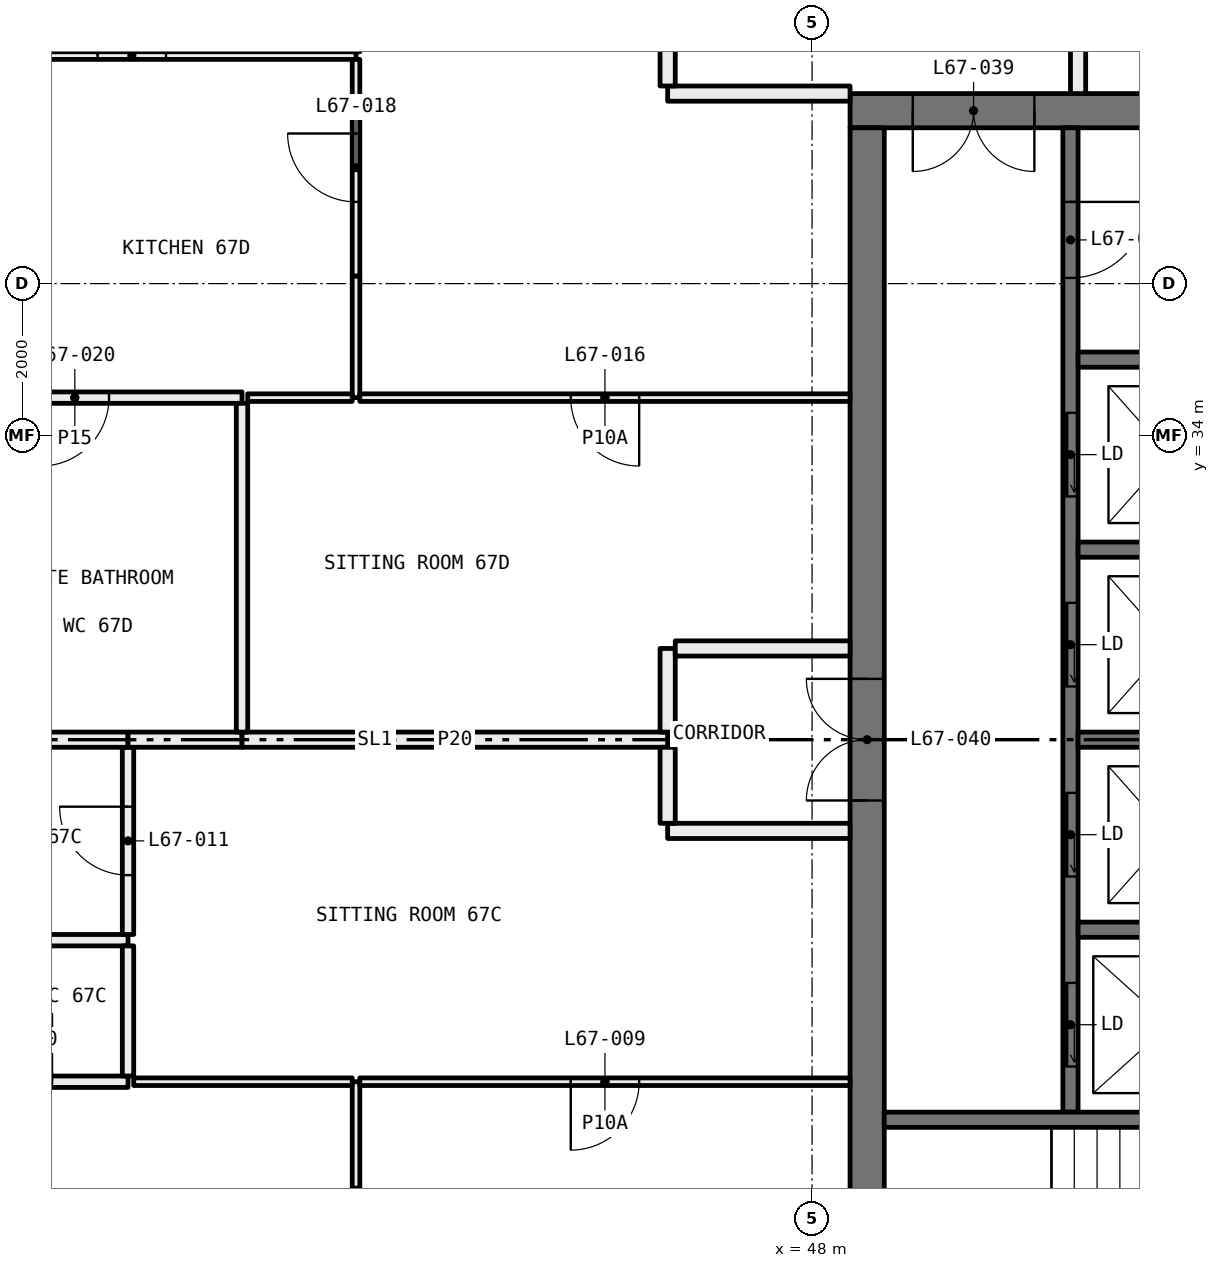
"""IFC4 building model, lengths in metres.
Left out: names, types, materials, properties, quantities, classifications, styles, units other than length and angle.
Written with IfcOpenShell. Run it as: python <this file> out.ifc"""

import sys

from ifc_helpers import new_model, si_unit, direction, frame, frame_2d, origin, place, context, subcontext, project, spatial, rectangle, extrude, element, fill, save


model = new_model("IFC4")
c1 = context("Model", 3, precision=1e-05, world=origin(), true_north=direction((0.0, 1.0)))
c2 = subcontext(c1, "Body", "Model", "MODEL_VIEW")
j1 = project(units=[si_unit("LENGTHUNIT", "METRE"), si_unit("PLANEANGLEUNIT", "RADIAN")], contexts=[c1])
p1 = place(None, origin())
s1 = spatial("IfcSite", under=j1, at=p1, CompositionType="ELEMENT")
p2 = place(p1, origin())
s2 = spatial("IfcBuilding", under=s1, at=p2, CompositionType="ELEMENT")
p3 = place(p2, frame((0.0, 0.0, 249.0)))
s3 = spatial("IfcBuildingStorey", under=s2, at=p3, CompositionType="ELEMENT", Elevation=249.0)
p4 = place(p3, frame((42.0, 24.1, 0.0), z_axis=(0.0, 0.0, 1.0), x_axis=(0.0, 1.0, 0.0)))
e1 = element("IfcWall", 1, at=p4, inside=s3, PredefinedType="PARTITIONING", context=c2, shape_type="SweptSolid", body=[
    extrude(rectangle(XDim=1.4, YDim=0.1, at=frame_2d((0.7, 0.0))), origin(), (0.0, 0.0, 1.0), 3.05),
])
p5 = place(p3, frame((39.0, 25.5, 0.0), z_axis=(0.0, 0.0, 1.0), x_axis=(-1.0, 0.0, 0.0)))
e2 = element("IfcWall", 2, at=p5, inside=s3, PredefinedType="PARTITIONING", context=c2, shape_type="SweptSolid", body=[
    extrude(rectangle(XDim=2.9, YDim=0.15, at=frame_2d((1.45, 0.0))), origin(), (0.0, 0.0, 1.0), 3.05),
])
p6 = place(p5, frame((1.0, 0.0, 0.0)))
e3 = element("IfcOpeningElement", 3, at=p6, cuts=e2, PredefinedType="OPENING", context=c2, shape_type="SweptSolid", body=[
    extrude(rectangle(XDim=0.9, YDim=2.1, at=frame_2d((0.45, 1.05))), frame((0.0, 0.085, 0.0), z_axis=(0.0, -1.0, 0.0), x_axis=(1.0, 0.0, 0.0)), (0.0, 0.0, 1.0), 0.17),
])
p7 = place(p3, frame((41.95, 25.5, 0.0), z_axis=(0.0, 0.0, 1.0), x_axis=(-1.0, 0.0, 0.0)))
e4 = element("IfcWall", 4, at=p7, inside=s3, PredefinedType="PARTITIONING", context=c2, shape_type="SweptSolid", body=[
    extrude(rectangle(XDim=2.875, YDim=0.1, at=frame_2d((1.438, 0.0))), origin(), (0.0, 0.0, 1.0), 3.05),
])
p8 = place(p3, frame((48.5, 25.5, 0.0), z_axis=(0.0, 0.0, 1.0), x_axis=(-1.0, 0.0, 0.0)))
e5 = element("IfcWall", 5, at=p8, inside=s3, PredefinedType="PARTITIONING", context=c2, shape_type="SweptSolid", body=[
    extrude(rectangle(XDim=6.45, YDim=0.1, at=frame_2d((3.225, 0.0))), origin(), (0.0, 0.0, 1.0), 3.05),
])
p9 = place(p8, frame((2.775, 0.0, 0.0)))
e6 = element("IfcOpeningElement", 6, at=p9, cuts=e5, PredefinedType="OPENING", context=c2, shape_type="SweptSolid", body=[
    extrude(rectangle(XDim=0.9, YDim=2.1, at=frame_2d((0.45, 1.05))), frame((0.0, 0.06, 0.0), z_axis=(0.0, -1.0, 0.0), x_axis=(1.0, 0.0, 0.0)), (0.0, 0.0, 1.0), 0.12),
])
p10 = place(p3, frame((39.0, 27.362, 0.0), z_axis=(0.0, 0.0, 1.0), x_axis=(-1.0, 0.0, 0.0)))
e7 = element("IfcWall", 7, at=p10, inside=s3, PredefinedType="PARTITIONING", context=c2, shape_type="SweptSolid", body=[
    extrude(rectangle(XDim=2.9, YDim=0.15, at=frame_2d((1.45, 0.0))), origin(), (0.0, 0.0, 1.0), 3.05),
])
p11 = place(p3, frame((39.0, 25.575, 0.0), z_axis=(0.0, 0.0, 1.0), x_axis=(0.0, 1.0, 0.0)))
e8 = element("IfcWall", 8, at=p11, inside=s3, PredefinedType="PARTITIONING", context=c2, shape_type="SweptSolid", body=[
    extrude(rectangle(XDim=1.712, YDim=0.15, at=frame_2d((0.856, 0.0))), origin(), (0.0, 0.0, 1.0), 3.05),
])
p12 = place(p3, frame((39.0, 27.437, 0.0), z_axis=(0.0, 0.0, 1.0), x_axis=(0.0, 1.0, 0.0)))
e9 = element("IfcWall", 9, at=p12, inside=s3, PredefinedType="PARTITIONING", context=c2, shape_type="SweptSolid", body=[
    extrude(rectangle(XDim=2.463, YDim=0.15, at=frame_2d((1.231, 0.0))), origin(), (0.0, 0.0, 1.0), 3.05),
])
p13 = place(p12, frame((0.781, 0.0, 0.0)))
e10 = element("IfcOpeningElement", 10, at=p13, cuts=e9, PredefinedType="OPENING", context=c2, shape_type="SweptSolid", body=[
    extrude(rectangle(XDim=0.9, YDim=2.1, at=frame_2d((0.45, 1.05))), frame((0.0, 0.085, 0.0), z_axis=(0.0, -1.0, 0.0), x_axis=(1.0, 0.0, 0.0)), (0.0, 0.0, 1.0), 0.17),
])
p14 = place(p3, frame((39.0, 30.0, 0.0), z_axis=(0.0, 0.0, 1.0), x_axis=(-1.0, 0.0, 0.0)))
e11 = element("IfcWall", 11, at=p14, inside=s3, PredefinedType="PARTITIONING", context=c2, shape_type="SweptSolid", body=[
    extrude(rectangle(XDim=2.9, YDim=0.2, at=frame_2d((1.45, 0.0))), origin(), (0.0, 0.0, 1.0), 3.05),
])
p15 = place(p3, frame((40.5, 30.0, 0.0), z_axis=(0.0, 0.0, 1.0), x_axis=(-1.0, 0.0, 0.0)))
e12 = element("IfcWall", 12, at=p15, inside=s3, PredefinedType="PARTITIONING", context=c2, shape_type="SweptSolid", body=[
    extrude(rectangle(XDim=1.5, YDim=0.2, at=frame_2d((0.75, 0.0))), origin(), (0.0, 0.0, 1.0), 3.05),
])
p16 = place(p3, frame((46.1, 30.0, 0.0), z_axis=(0.0, 0.0, 1.0), x_axis=(-1.0, 0.0, 0.0)))
e13 = element("IfcWall", 13, at=p16, inside=s3, PredefinedType="PARTITIONING", context=c2, shape_type="SweptSolid", body=[
    extrude(rectangle(XDim=5.6, YDim=0.2, at=frame_2d((2.8, 0.0))), origin(), (0.0, 0.0, 1.0), 3.05),
])
p17 = place(p3, frame((48.5, 28.8, 0.0), z_axis=(0.0, 0.0, 1.0), x_axis=(-1.0, 0.0, 0.0)))
e14 = element("IfcWall", 14, at=p17, inside=s3, PredefinedType="PARTITIONING", context=c2, shape_type="SweptSolid", body=[
    extrude(rectangle(XDim=2.4, YDim=0.2, at=frame_2d((1.2, 0.0))), origin(), (0.0, 0.0, 1.0), 3.05),
])
p18 = place(p3, frame((46.1, 28.9, 0.0), z_axis=(0.0, 0.0, 1.0), x_axis=(0.0, 1.0, 0.0)))
e15 = element("IfcWall", 15, at=p18, inside=s3, PredefinedType="PARTITIONING", context=c2, shape_type="SweptSolid", body=[
    extrude(rectangle(XDim=1.0, YDim=0.2, at=frame_2d((0.5, 0.0))), origin(), (0.0, 0.0, 1.0), 3.05),
])
p19 = place(p3, frame((51.5, 41.9, 0.0), z_axis=(0.0, 0.0, 1.0), x_axis=(0.0, -1.0, 0.0)))
e16 = element("IfcWall", 16, at=p19, inside=s3, PredefinedType="PARTITIONING", context=c2, shape_type="SweptSolid", body=[
    extrude(rectangle(XDim=3.4, YDim=0.2, at=frame_2d((1.7, 0.0))), origin(), (0.0, 0.0, 1.0), 3.05),
])
p20 = place(p19, frame((1.2, 0.0, 0.0)))
e17 = element("IfcOpeningElement", 17, at=p20, cuts=e16, PredefinedType="OPENING", context=c2, shape_type="SweptSolid", body=[
    extrude(rectangle(XDim=1.0, YDim=2.1, at=frame_2d((0.5, 1.05))), frame((0.0, 0.11, 0.0), z_axis=(0.0, -1.0, 0.0), x_axis=(1.0, 0.0, 0.0)), (0.0, 0.0, 1.0), 0.22),
])
p21 = place(p3, frame((42.0, 39.0, 0.0), z_axis=(0.0, 0.0, 1.0), x_axis=(-1.0, 0.0, 0.0)))
e18 = element("IfcWall", 18, at=p21, inside=s3, PredefinedType="PARTITIONING", context=c2, shape_type="SweptSolid", body=[
    extrude(rectangle(XDim=5.9, YDim=0.1, at=frame_2d((2.95, 0.0))), origin(), (0.0, 0.0, 1.0), 3.05),
])
p22 = place(p21, frame((2.5, 0.0, 0.0)))
e19 = element("IfcOpeningElement", 19, at=p22, cuts=e18, PredefinedType="OPENING", context=c2, shape_type="SweptSolid", body=[
    extrude(rectangle(XDim=0.9, YDim=2.1, at=frame_2d((0.45, 1.05))), frame((0.0, 0.06, 0.0), z_axis=(0.0, -1.0, 0.0), x_axis=(1.0, 0.0, 0.0)), (0.0, 0.0, 1.0), 0.12),
])
p23 = place(p3, frame((42.0, 34.5, 0.0), z_axis=(0.0, 0.0, 1.0), x_axis=(0.0, 1.0, 0.0)))
e20 = element("IfcWall", 20, at=p23, inside=s3, PredefinedType="PARTITIONING", context=c2, shape_type="SweptSolid", body=[
    extrude(rectangle(XDim=1.6, YDim=0.1, at=frame_2d((0.8, 0.0))), origin(), (0.0, 0.0, 1.0), 2.45),
])
p24 = place(p3, frame((42.0, 36.1, 0.0), z_axis=(0.0, 0.0, 1.0), x_axis=(0.0, 1.0, 0.0)))
e21 = element("IfcWall", 21, at=p24, inside=s3, PredefinedType="PARTITIONING", context=c2, shape_type="SweptSolid", body=[
    extrude(rectangle(XDim=2.85, YDim=0.1, at=frame_2d((1.425, 0.0))), origin(), (0.0, 0.0, 1.0), 3.05),
])
p25 = place(p24, frame((0.975, 0.0, 0.0)))
e22 = element("IfcOpeningElement", 22, at=p25, cuts=e21, PredefinedType="OPENING", context=c2, shape_type="SweptSolid", body=[
    extrude(rectangle(XDim=0.9, YDim=2.1, at=frame_2d((0.45, 1.05))), frame((0.0, 0.06, 0.0), z_axis=(0.0, -1.0, 0.0), x_axis=(1.0, 0.0, 0.0)), (0.0, 0.0, 1.0), 0.12),
])
p26 = place(p3, frame((36.1, 34.5, 0.0), z_axis=(0.0, 0.0, 1.0), x_axis=(1.0, 0.0, 0.0)))
e23 = element("IfcWall", 23, at=p26, inside=s3, PredefinedType="PARTITIONING", context=c2, shape_type="SweptSolid", body=[
    extrude(rectangle(XDim=4.4, YDim=0.15, at=frame_2d((2.2, 0.0))), origin(), (0.0, 0.0, 1.0), 3.05),
])
p27 = place(p26, frame((1.75, 0.0, 0.0)))
e24 = element("IfcOpeningElement", 24, at=p27, cuts=e23, PredefinedType="OPENING", context=c2, shape_type="SweptSolid", body=[
    extrude(rectangle(XDim=0.9, YDim=2.1, at=frame_2d((0.45, 1.05))), frame((0.0, 0.085, 0.0), z_axis=(0.0, -1.0, 0.0), x_axis=(1.0, 0.0, 0.0)), (0.0, 0.0, 1.0), 0.17),
])
p28 = place(p3, frame((40.575, 34.5, 0.0), z_axis=(0.0, 0.0, 1.0), x_axis=(1.0, 0.0, 0.0)))
e25 = element("IfcWall", 25, at=p28, inside=s3, PredefinedType="PARTITIONING", context=c2, shape_type="SweptSolid", body=[
    extrude(rectangle(XDim=1.375, YDim=0.1, at=frame_2d((0.688, 0.0))), origin(), (0.0, 0.0, 1.0), 3.05),
])
p29 = place(p3, frame((42.05, 34.5, 0.0), z_axis=(0.0, 0.0, 1.0), x_axis=(1.0, 0.0, 0.0)))
e26 = element("IfcWall", 26, at=p29, inside=s3, PredefinedType="PARTITIONING", context=c2, shape_type="SweptSolid", body=[
    extrude(rectangle(XDim=6.45, YDim=0.1, at=frame_2d((3.225, 0.0))), origin(), (0.0, 0.0, 1.0), 3.05),
])
p30 = place(p29, frame((2.775, 0.0, 0.0)))
e27 = element("IfcOpeningElement", 27, at=p30, cuts=e26, PredefinedType="OPENING", context=c2, shape_type="SweptSolid", body=[
    extrude(rectangle(XDim=0.9, YDim=2.1, at=frame_2d((0.45, 1.05))), frame((0.0, 0.06, 0.0), z_axis=(0.0, -1.0, 0.0), x_axis=(1.0, 0.0, 0.0)), (0.0, 0.0, 1.0), 0.12),
])
p31 = place(p3, frame((48.5, 38.5, 0.0), z_axis=(0.0, 0.0, 1.0), x_axis=(-1.0, 0.0, 0.0)))
e28 = element("IfcWall", 28, at=p31, inside=s3, PredefinedType="PARTITIONING", context=c2, shape_type="SweptSolid", body=[
    extrude(rectangle(XDim=2.4, YDim=0.2, at=frame_2d((1.2, 0.0))), origin(), (0.0, 0.0, 1.0), 3.05),
])
p32 = place(p3, frame((46.1, 38.6, 0.0), z_axis=(0.0, 0.0, 1.0), x_axis=(0.0, 1.0, 0.0)))
e29 = element("IfcWall", 29, at=p32, inside=s3, PredefinedType="PARTITIONING", context=c2, shape_type="SweptSolid", body=[
    extrude(rectangle(XDim=3.3, YDim=0.2, at=frame_2d((1.65, 0.0))), origin(), (0.0, 0.0, 1.0), 3.05),
])
p33 = place(p3, frame((40.5, 30.1, 0.0), z_axis=(0.0, 0.0, 1.0), x_axis=(0.0, 1.0, 0.0)))
e30 = element("IfcWall", 30, at=p33, inside=s3, PredefinedType="PARTITIONING", context=c2, shape_type="SweptSolid", body=[
    extrude(rectangle(XDim=4.325, YDim=0.15, at=frame_2d((2.163, 0.0))), origin(), (0.0, 0.0, 1.0), 3.05),
])
p34 = place(p3, frame((46.1, 30.1, 0.0), z_axis=(0.0, 0.0, 1.0), x_axis=(0.0, 1.0, 0.0)))
e31 = element("IfcWall", 31, at=p34, inside=s3, PredefinedType="PARTITIONING", context=c2, shape_type="SweptSolid", body=[
    extrude(rectangle(XDim=1.1, YDim=0.2, at=frame_2d((0.55, 0.0))), origin(), (0.0, 0.0, 1.0), 3.05),
])
p35 = place(p3, frame((46.2, 31.2, 0.0), z_axis=(0.0, 0.0, 1.0), x_axis=(1.0, 0.0, 0.0)))
e32 = element("IfcWall", 32, at=p35, inside=s3, PredefinedType="PARTITIONING", context=c2, shape_type="SweptSolid", body=[
    extrude(rectangle(XDim=2.3, YDim=0.2, at=frame_2d((1.15, 0.0))), origin(), (0.0, 0.0, 1.0), 3.05),
])
p36 = place(p3, frame((59.5, 38.275, 0.0), z_axis=(0.0, 0.0, 1.0), x_axis=(-1.0, 0.0, 0.0)))
e33 = element("IfcWall", 33, at=p36, inside=s3, PredefinedType="SHEAR", context=c2, shape_type="SweptSolid", body=[
    extrude(rectangle(XDim=11.0, YDim=0.45, at=frame_2d((5.5, 0.0))), origin(), (0.0, 0.0, 1.0), 3.05),
])
p37 = place(p36, frame((8.575, 0.0, 0.0)))
e34 = element("IfcOpeningElement", 34, at=p37, cuts=e33, PredefinedType="OPENING", context=c2, shape_type="SweptSolid", body=[
    extrude(rectangle(XDim=1.6, YDim=2.1, at=frame_2d((0.8, 1.05))), frame((0.0, 0.235, 0.0), z_axis=(0.0, -1.0, 0.0), x_axis=(1.0, 0.0, 0.0)), (0.0, 0.0, 1.0), 0.47),
])
p38 = place(p3, frame((48.725, 21.95, 0.0), z_axis=(0.0, 0.0, 1.0), x_axis=(0.0, 1.0, 0.0)))
e35 = element("IfcWall", 35, at=p38, inside=s3, PredefinedType="SHEAR", context=c2, shape_type="SweptSolid", body=[
    extrude(rectangle(XDim=16.1, YDim=0.45, at=frame_2d((8.05, 0.0))), origin(), (0.0, 0.0, 1.0), 3.05),
])
p39 = place(p38, frame((7.25, 0.0, 0.0)))
e36 = element("IfcOpeningElement", 36, at=p39, cuts=e35, PredefinedType="OPENING", context=c2, shape_type="SweptSolid", body=[
    extrude(rectangle(XDim=1.6, YDim=2.1, at=frame_2d((0.8, 1.05))), frame((0.0, 0.235, 0.0), z_axis=(0.0, -1.0, 0.0), x_axis=(1.0, 0.0, 0.0)), (0.0, 0.0, 1.0), 0.47),
])
p40 = place(p3, frame((51.4, 25.1, 0.0), z_axis=(0.0, 0.0, 1.0), x_axis=(0.0, 1.0, 0.0)))
e37 = element("IfcWall", 37, at=p40, inside=s3, PredefinedType="SOLIDWALL", context=c2, shape_type="SweptSolid", body=[
    extrude(rectangle(XDim=12.95, YDim=0.2, at=frame_2d((6.475, 0.0))), origin(), (0.0, 0.0, 1.0), 3.05),
])
p41 = place(p40, frame((0.6, 0.0, 0.0)))
e38 = element("IfcOpeningElement", 38, at=p41, cuts=e37, PredefinedType="OPENING", context=c2, shape_type="SweptSolid", body=[
    extrude(rectangle(XDim=1.1, YDim=2.1, at=frame_2d((0.55, 1.05))), frame((0.0, 0.11, 0.0), z_axis=(0.0, -1.0, 0.0), x_axis=(1.0, 0.0, 0.0)), (0.0, 0.0, 1.0), 0.22),
])
p42 = place(p40, frame((3.1, 0.0, 0.0)))
e39 = element("IfcOpeningElement", 39, at=p42, cuts=e37, PredefinedType="OPENING", context=c2, shape_type="SweptSolid", body=[
    extrude(rectangle(XDim=1.1, YDim=2.1, at=frame_2d((0.55, 1.05))), frame((0.0, 0.11, 0.0), z_axis=(0.0, -1.0, 0.0), x_axis=(1.0, 0.0, 0.0)), (0.0, 0.0, 1.0), 0.22),
])
p43 = place(p40, frame((5.6, 0.0, 0.0)))
e40 = element("IfcOpeningElement", 40, at=p43, cuts=e37, PredefinedType="OPENING", context=c2, shape_type="SweptSolid", body=[
    extrude(rectangle(XDim=1.1, YDim=2.1, at=frame_2d((0.55, 1.05))), frame((0.0, 0.11, 0.0), z_axis=(0.0, -1.0, 0.0), x_axis=(1.0, 0.0, 0.0)), (0.0, 0.0, 1.0), 0.22),
])
p44 = place(p40, frame((8.1, 0.0, 0.0)))
e41 = element("IfcOpeningElement", 41, at=p44, cuts=e37, PredefinedType="OPENING", context=c2, shape_type="SweptSolid", body=[
    extrude(rectangle(XDim=1.1, YDim=2.1, at=frame_2d((0.55, 1.05))), frame((0.0, 0.11, 0.0), z_axis=(0.0, -1.0, 0.0), x_axis=(1.0, 0.0, 0.0)), (0.0, 0.0, 1.0), 0.22),
])
p45 = place(p40, frame((10.975, 0.0, 0.0)))
e42 = element("IfcOpeningElement", 42, at=p45, cuts=e37, PredefinedType="OPENING", context=c2, shape_type="SweptSolid", body=[
    extrude(rectangle(XDim=1.0, YDim=2.1, at=frame_2d((0.5, 1.05))), frame((0.0, 0.11, 0.0), z_axis=(0.0, -1.0, 0.0), x_axis=(1.0, 0.0, 0.0)), (0.0, 0.0, 1.0), 0.22),
])
for number, where, z_axis, x_axis in (
    (43, (56.5, 25.0, 0.0), (0.0, 0.0, 1.0), (-1.0, 0.0, 0.0)),
    (44, (59.05, 35.0, 0.0), (0.0, 0.0, 1.0), (-1.0, 0.0, 0.0)),
):
    element("IfcWall", number, at=place(p3, frame(where, z_axis=z_axis, x_axis=x_axis)), inside=s3, PredefinedType="SOLIDWALL", context=c2, shape_type="SweptSolid", body=[
        extrude(rectangle(XDim=7.55, YDim=0.2, at=frame_2d((3.775, 0.0))), origin(), (0.0, 0.0, 1.0), 3.05),
    ])
for number, where, z_axis, x_axis in (
    (45, (53.9, 27.5, 0.0), (0.0, 0.0, 1.0), (-1.0, 0.0, 0.0)),
    (46, (53.9, 30.0, 0.0), (0.0, 0.0, 1.0), (-1.0, 0.0, 0.0)),
    (47, (53.9, 32.5, 0.0), (0.0, 0.0, 1.0), (-1.0, 0.0, 0.0)),
):
    element("IfcWall", number, at=place(p3, frame(where, z_axis=z_axis, x_axis=x_axis)), inside=s3, PredefinedType="SOLIDWALL", context=c2, shape_type="SweptSolid", body=[
        extrude(rectangle(XDim=2.4, YDim=0.2, at=frame_2d((1.2, 0.0))), origin(), (0.0, 0.0, 1.0), 3.05),
    ])
p46 = place(p9, origin())
e48 = element("IfcDoor", 48, at=p46, inside=s3, OperationType="SINGLE_SWING_LEFT", PredefinedType="DOOR", context=c2, shape_type="SweptSolid", body=[
    extrude(rectangle(XDim=0.9, YDim=2.1, at=frame_2d((0.45, 1.05))), frame((0.0, 0.025, 0.0), z_axis=(0.0, -1.0, 0.0), x_axis=(1.0, 0.0, 0.0)), (0.0, 0.0, 1.0), 0.05),
])
fill(e6, e48)
p47 = place(p13, origin())
e49 = element("IfcDoor", 49, at=p47, inside=s3, OperationType="SINGLE_SWING_LEFT", PredefinedType="DOOR", context=c2, shape_type="SweptSolid", body=[
    extrude(rectangle(XDim=0.9, YDim=2.1, at=frame_2d((0.45, 1.05))), frame((0.0, 0.025, 0.0), z_axis=(0.0, -1.0, 0.0), x_axis=(1.0, 0.0, 0.0)), (0.0, 0.0, 1.0), 0.05),
])
fill(e10, e49)
p48 = place(p30, frame((0.9, 0.0, 0.0), x_axis=(-1.0, 0.0, 0.0)))
e50 = element("IfcDoor", 50, at=p48, inside=s3, OperationType="SINGLE_SWING_RIGHT", PredefinedType="DOOR", context=c2, shape_type="SweptSolid", body=[
    extrude(rectangle(XDim=0.9, YDim=2.1, at=frame_2d((0.45, 1.05))), frame((0.0, 0.025, 0.0), z_axis=(0.0, -1.0, 0.0), x_axis=(1.0, 0.0, 0.0)), (0.0, 0.0, 1.0), 0.05),
])
fill(e27, e50)
p49 = place(p25, origin())
e51 = element("IfcDoor", 51, at=p49, inside=s3, OperationType="SINGLE_SWING_LEFT", PredefinedType="DOOR", context=c2, shape_type="SweptSolid", body=[
    extrude(rectangle(XDim=0.9, YDim=2.1, at=frame_2d((0.45, 1.05))), frame((0.0, 0.025, 0.0), z_axis=(0.0, -1.0, 0.0), x_axis=(1.0, 0.0, 0.0)), (0.0, 0.0, 1.0), 0.05),
])
fill(e22, e51)
p50 = place(p22, frame((0.9, 0.0, 0.0), x_axis=(-1.0, 0.0, 0.0)))
e52 = element("IfcDoor", 52, at=p50, inside=s3, OperationType="SINGLE_SWING_RIGHT", PredefinedType="DOOR", context=c2, shape_type="SweptSolid", body=[
    extrude(rectangle(XDim=0.9, YDim=2.1, at=frame_2d((0.45, 1.05))), frame((0.0, 0.025, 0.0), z_axis=(0.0, -1.0, 0.0), x_axis=(1.0, 0.0, 0.0)), (0.0, 0.0, 1.0), 0.05),
])
fill(e19, e52)
p51 = place(p27, frame((0.9, 0.0, 0.0), x_axis=(-1.0, 0.0, 0.0)))
e53 = element("IfcDoor", 53, at=p51, inside=s3, OperationType="SINGLE_SWING_LEFT", PredefinedType="DOOR", context=c2, shape_type="SweptSolid", body=[
    extrude(rectangle(XDim=0.9, YDim=2.1, at=frame_2d((0.45, 1.05))), frame((0.0, 0.025, 0.0), z_axis=(0.0, -1.0, 0.0), x_axis=(1.0, 0.0, 0.0)), (0.0, 0.0, 1.0), 0.05),
])
fill(e24, e53)
p52 = place(p41, origin())
e54 = element("IfcDoor", 54, at=p52, inside=s3, OperationType="SLIDING_TO_LEFT", PredefinedType="DOOR", context=c2, shape_type="SweptSolid", body=[
    extrude(rectangle(XDim=1.1, YDim=2.1, at=frame_2d((0.55, 1.05))), frame((0.0, 0.025, 0.0), z_axis=(0.0, -1.0, 0.0), x_axis=(1.0, 0.0, 0.0)), (0.0, 0.0, 1.0), 0.05),
])
fill(e38, e54)
p53 = place(p42, origin())
e55 = element("IfcDoor", 55, at=p53, inside=s3, OperationType="SLIDING_TO_LEFT", PredefinedType="DOOR", context=c2, shape_type="SweptSolid", body=[
    extrude(rectangle(XDim=1.1, YDim=2.1, at=frame_2d((0.55, 1.05))), frame((0.0, 0.025, 0.0), z_axis=(0.0, -1.0, 0.0), x_axis=(1.0, 0.0, 0.0)), (0.0, 0.0, 1.0), 0.05),
])
fill(e39, e55)
p54 = place(p43, origin())
e56 = element("IfcDoor", 56, at=p54, inside=s3, OperationType="SLIDING_TO_LEFT", PredefinedType="DOOR", context=c2, shape_type="SweptSolid", body=[
    extrude(rectangle(XDim=1.1, YDim=2.1, at=frame_2d((0.55, 1.05))), frame((0.0, 0.025, 0.0), z_axis=(0.0, -1.0, 0.0), x_axis=(1.0, 0.0, 0.0)), (0.0, 0.0, 1.0), 0.05),
])
fill(e40, e56)
p55 = place(p44, origin())
e57 = element("IfcDoor", 57, at=p55, inside=s3, OperationType="SLIDING_TO_LEFT", PredefinedType="DOOR", context=c2, shape_type="SweptSolid", body=[
    extrude(rectangle(XDim=1.1, YDim=2.1, at=frame_2d((0.55, 1.05))), frame((0.0, 0.025, 0.0), z_axis=(0.0, -1.0, 0.0), x_axis=(1.0, 0.0, 0.0)), (0.0, 0.0, 1.0), 0.05),
])
fill(e41, e57)
p56 = place(p45, frame((1.0, 0.0, 0.0), x_axis=(-1.0, 0.0, 0.0)))
e58 = element("IfcDoor", 58, at=p56, inside=s3, OperationType="SINGLE_SWING_RIGHT", PredefinedType="DOOR", context=c2, shape_type="SweptSolid", body=[
    extrude(rectangle(XDim=1.0, YDim=2.1, at=frame_2d((0.5, 1.05))), frame((0.0, 0.025, 0.0), z_axis=(0.0, -1.0, 0.0), x_axis=(1.0, 0.0, 0.0)), (0.0, 0.0, 1.0), 0.05),
])
fill(e42, e58)
p57 = place(p37, origin())
e59 = element("IfcDoor", 59, at=p57, inside=s3, OperationType="DOUBLE_DOOR_SINGLE_SWING", PredefinedType="DOOR", context=c2, shape_type="SweptSolid", body=[
    extrude(rectangle(XDim=1.6, YDim=2.1, at=frame_2d((0.8, 1.05))), frame((0.0, 0.025, 0.0), z_axis=(0.0, -1.0, 0.0), x_axis=(1.0, 0.0, 0.0)), (0.0, 0.0, 1.0), 0.05),
])
fill(e34, e59)
p58 = place(p39, origin())
e60 = element("IfcDoor", 60, at=p58, inside=s3, OperationType="DOUBLE_DOOR_SINGLE_SWING", PredefinedType="DOOR", context=c2, shape_type="SweptSolid", body=[
    extrude(rectangle(XDim=1.6, YDim=2.1, at=frame_2d((0.8, 1.05))), frame((0.0, 0.025, 0.0), z_axis=(0.0, -1.0, 0.0), x_axis=(1.0, 0.0, 0.0)), (0.0, 0.0, 1.0), 0.05),
])
fill(e36, e60)
save(model, sys.argv[1])
